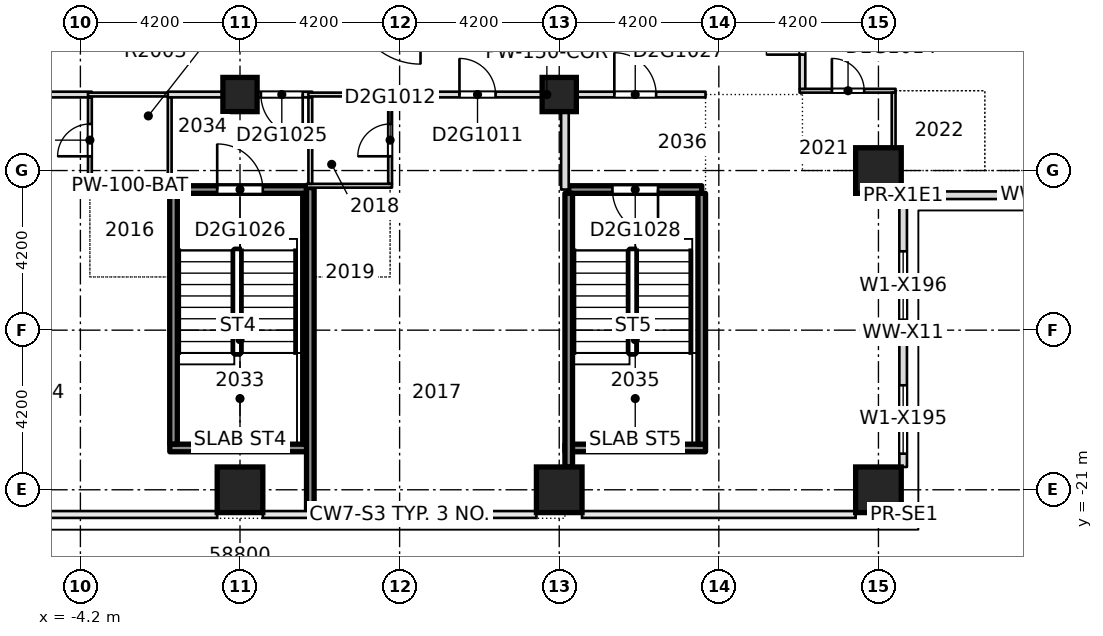
"""IFC4 building model, lengths in metres.
Left out: names, types, materials, properties, quantities, classifications, styles, units other than length and angle.
Written with IfcOpenShell. Run it as: python <this file> out.ifc"""

import sys

from ifc_helpers import new_model, si_unit, direction, frame, frame_2d, origin, origin_2d, place, context, subcontext, project, spatial, rectangle, extrude, element, fill, save


model = new_model("IFC4")
c1 = context("Model", 3, precision=1e-05, world=origin(), true_north=direction((0.0, 1.0)))
c2 = subcontext(c1, "Body", "Model", "MODEL_VIEW")
j1 = project(units=[si_unit("LENGTHUNIT", "METRE"), si_unit("PLANEANGLEUNIT", "RADIAN")], contexts=[c1])
p1 = place(None, origin())
s1 = spatial("IfcSite", under=j1, at=p1, CompositionType="ELEMENT")
p2 = place(p1, origin())
s2 = spatial("IfcBuilding", under=s1, at=p2, CompositionType="ELEMENT")
p3 = place(p2, frame((0.0, 0.0, 83.85)))
s3 = spatial("IfcBuildingStorey", under=s2, at=p3, CompositionType="ELEMENT", Elevation=83.85)
for number, where, z_axis, x_axis in (
    (1, (0.0, -21.0, -0.32), (0.0, 0.0, 1.0), (1.0, 0.0, 0.0)),
    (2, (8.4, -21.0, -0.32), (0.0, 0.0, 1.0), (1.0, 0.0, 0.0)),
    (3, (16.8, -21.0, -0.32), (0.0, 0.0, 1.0), (1.0, 0.0, 0.0)),
    (4, (16.8, -12.6, -0.32), (0.0, 0.0, 1.0), (1.0, 0.0, 0.0)),
):
    element("IfcColumn", number, at=place(p3, frame(where, z_axis=z_axis, x_axis=x_axis)), inside=s3, PredefinedType="COLUMN", context=c2, shape_type="SweptSolid", body=[
        extrude(rectangle(XDim=1.2, YDim=1.2, at=origin_2d()), origin(), (0.0, 0.0, 1.0), 3.45),
    ])
for number, where, z_axis, x_axis in (
    (5, (0.0, -10.6, -0.32), (0.0, 0.0, 1.0), (1.0, 0.0, 0.0)),
    (6, (8.4, -10.6, -0.32), (0.0, 0.0, 1.0), (1.0, 0.0, 0.0)),
):
    element("IfcColumn", number, at=place(p3, frame(where, z_axis=z_axis, x_axis=x_axis)), inside=s3, PredefinedType="COLUMN", context=c2, shape_type="SweptSolid", body=[
        extrude(rectangle(XDim=0.9, YDim=0.9, at=origin_2d()), origin(), (0.0, 0.0, 1.0), 3.45),
    ])
p4 = place(p3, frame((-1.848, -19.9, 0.0), z_axis=(0.0, 0.0, 1.0), x_axis=(1.0, 0.0, 0.0)))
e7 = element("IfcWall", 7, at=p4, inside=s3, PredefinedType="SOLIDWALL", context=c2, shape_type="SweptSolid", body=[
    extrude(rectangle(XDim=3.696, YDim=0.2, at=frame_2d((1.848, 0.0))), origin(), (0.0, 0.0, 1.0), 3.13),
])
p5 = place(p3, frame((-1.848, -13.1, 0.0), z_axis=(0.0, 0.0, 1.0), x_axis=(1.0, 0.0, 0.0)))
e8 = element("IfcWall", 8, at=p5, inside=s3, PredefinedType="SOLIDWALL", context=c2, shape_type="SweptSolid", body=[
    extrude(rectangle(XDim=3.596, YDim=0.2, at=frame_2d((1.798, 0.0))), origin(), (0.0, 0.0, 1.0), 3.13),
])
p6 = place(p5, frame((1.248, 0.0, 0.0)))
e9 = element("IfcOpeningElement", 9, at=p6, cuts=e8, PredefinedType="OPENING", context=c2, shape_type="SweptSolid", body=[
    extrude(rectangle(XDim=1.2, YDim=2.1, at=frame_2d((0.6, 1.05))), frame((0.0, 0.11, 0.0), z_axis=(0.0, -1.0, 0.0), x_axis=(1.0, 0.0, 0.0)), (0.0, 0.0, 1.0), 0.22),
])
p7 = place(p3, frame((8.65, -13.1, 0.0), z_axis=(0.0, 0.0, 1.0), x_axis=(1.0, 0.0, 0.0)))
e10 = element("IfcWall", 10, at=p7, inside=s3, PredefinedType="SOLIDWALL", context=c2, shape_type="SweptSolid", body=[
    extrude(rectangle(XDim=3.5, YDim=0.2, at=frame_2d((1.75, 0.0))), origin(), (0.0, 0.0, 1.0), 3.13),
])
p8 = place(p7, frame((1.15, 0.0, 0.0)))
e11 = element("IfcOpeningElement", 11, at=p8, cuts=e10, PredefinedType="OPENING", context=c2, shape_type="SweptSolid", body=[
    extrude(rectangle(XDim=1.2, YDim=2.1, at=frame_2d((0.6, 1.05))), frame((0.0, 0.11, 0.0), z_axis=(0.0, -1.0, 0.0), x_axis=(1.0, 0.0, 0.0)), (0.0, 0.0, 1.0), 0.22),
])
p9 = place(p3, frame((-4.0, -13.0, 0.0), z_axis=(0.0, 0.0, 1.0), x_axis=(1.0, 0.0, 0.0)))
e12 = element("IfcWall", 12, at=p9, inside=s3, PredefinedType="PARTITIONING", context=c2, shape_type="SweptSolid", body=[
    extrude(rectangle(XDim=2.2, YDim=0.1, at=frame_2d((1.1, 0.0))), origin(), (0.0, 0.0, 1.0), 3.13),
])
p10 = place(p3, frame((1.75, -13.0, 0.0), z_axis=(0.0, 0.0, 1.0), x_axis=(1.0, 0.0, 0.0)))
e13 = element("IfcWall", 13, at=p10, inside=s3, PredefinedType="PARTITIONING", context=c2, shape_type="SweptSolid", body=[
    extrude(rectangle(XDim=2.25, YDim=0.1, at=frame_2d((1.125, 0.0))), origin(), (0.0, 0.0, 1.0), 3.13),
])
p11 = place(p3, frame((-12.25, -10.6, 0.0), z_axis=(0.0, 0.0, 1.0), x_axis=(1.0, 0.0, 0.0)))
e14 = element("IfcWall", 14, at=p11, inside=s3, PredefinedType="PARTITIONING", context=c2, shape_type="SweptSolid", body=[
    extrude(rectangle(XDim=8.35, YDim=0.15, at=frame_2d((4.175, 0.0))), origin(), (0.0, 0.0, 1.0), 3.13),
])
p12 = place(p11, frame((5.525, 0.0, 0.0)))
e15 = element("IfcOpeningElement", 15, at=p12, cuts=e14, PredefinedType="OPENING", context=c2, shape_type="SweptSolid", body=[
    extrude(rectangle(XDim=0.95, YDim=2.1, at=frame_2d((0.475, 1.05))), frame((0.0, 0.085, 0.0), z_axis=(0.0, -1.0, 0.0), x_axis=(1.0, 0.0, 0.0)), (0.0, 0.0, 1.0), 0.17),
])
p13 = place(p11, frame((1.3, 0.0, 0.0)))
e16 = element("IfcOpeningElement", 16, at=p13, cuts=e14, PredefinedType="OPENING", context=c2, shape_type="SweptSolid", body=[
    extrude(rectangle(XDim=1.1, YDim=2.1, at=frame_2d((0.55, 1.05))), frame((0.0, 0.085, 0.0), z_axis=(0.0, -1.0, 0.0), x_axis=(1.0, 0.0, 0.0)), (0.0, 0.0, 1.0), 0.17),
])
p14 = place(p3, frame((-4.0, -10.6, 0.0), z_axis=(0.0, 0.0, 1.0), x_axis=(1.0, 0.0, 0.0)))
e17 = element("IfcWall", 17, at=p14, inside=s3, PredefinedType="PARTITIONING", context=c2, shape_type="SweptSolid", body=[
    extrude(rectangle(XDim=2.2, YDim=0.1, at=frame_2d((1.1, 0.0))), origin(), (0.0, 0.0, 1.0), 3.13),
])
p15 = place(p3, frame((-1.9, -10.6, 0.0), z_axis=(0.0, 0.0, 1.0), x_axis=(1.0, 0.0, 0.0)))
e18 = element("IfcWall", 18, at=p15, inside=s3, PredefinedType="PARTITIONING", context=c2, shape_type="SweptSolid", body=[
    extrude(rectangle(XDim=3.8, YDim=0.15, at=frame_2d((1.9, 0.0))), origin(), (0.0, 0.0, 1.0), 3.13),
])
p16 = place(p15, frame((2.45, 0.0, 0.0)))
e19 = element("IfcOpeningElement", 19, at=p16, cuts=e18, PredefinedType="OPENING", context=c2, shape_type="SweptSolid", body=[
    extrude(rectangle(XDim=1.1, YDim=2.1, at=frame_2d((0.55, 1.05))), frame((0.0, 0.085, 0.0), z_axis=(0.0, -1.0, 0.0), x_axis=(1.0, 0.0, 0.0)), (0.0, 0.0, 1.0), 0.17),
])
p17 = place(p3, frame((1.8, -10.6, 0.0), z_axis=(0.0, 0.0, 1.0), x_axis=(1.0, 0.0, 0.0)))
e20 = element("IfcWall", 20, at=p17, inside=s3, PredefinedType="PARTITIONING", context=c2, shape_type="SweptSolid", body=[
    extrude(rectangle(XDim=2.2, YDim=0.1, at=frame_2d((1.1, 0.0))), origin(), (0.0, 0.0, 1.0), 3.13),
])
p18 = place(p3, frame((3.9, -10.6, 0.0), z_axis=(0.0, 0.0, 1.0), x_axis=(1.0, 0.0, 0.0)))
e21 = element("IfcWall", 21, at=p18, inside=s3, PredefinedType="PARTITIONING", context=c2, shape_type="SweptSolid", body=[
    extrude(rectangle(XDim=8.35, YDim=0.15, at=frame_2d((4.175, 0.0))), origin(), (0.0, 0.0, 1.0), 3.13),
])
p19 = place(p18, frame((1.875, 0.0, 0.0)))
e22 = element("IfcOpeningElement", 22, at=p19, cuts=e21, PredefinedType="OPENING", context=c2, shape_type="SweptSolid", body=[
    extrude(rectangle(XDim=0.95, YDim=2.1, at=frame_2d((0.475, 1.05))), frame((0.0, 0.085, 0.0), z_axis=(0.0, -1.0, 0.0), x_axis=(1.0, 0.0, 0.0)), (0.0, 0.0, 1.0), 0.17),
])
p20 = place(p18, frame((5.95, 0.0, 0.0)))
e23 = element("IfcOpeningElement", 23, at=p20, cuts=e21, PredefinedType="OPENING", context=c2, shape_type="SweptSolid", body=[
    extrude(rectangle(XDim=1.1, YDim=2.1, at=frame_2d((0.55, 1.05))), frame((0.0, 0.085, 0.0), z_axis=(0.0, -1.0, 0.0), x_axis=(1.0, 0.0, 0.0)), (0.0, 0.0, 1.0), 0.17),
])
p21 = place(p3, frame((14.725, -10.5, 0.0), z_axis=(0.0, 0.0, 1.0), x_axis=(1.0, 0.0, 0.0)))
e24 = element("IfcWall", 24, at=p21, inside=s3, PredefinedType="PARTITIONING", context=c2, shape_type="SweptSolid", body=[
    extrude(rectangle(XDim=2.525, YDim=0.1, at=frame_2d((1.262, 0.0))), origin(), (0.0, 0.0, 1.0), 3.13),
])
p22 = place(p21, frame((0.85, 0.0, 0.0)))
e25 = element("IfcOpeningElement", 25, at=p22, cuts=e24, PredefinedType="OPENING", context=c2, shape_type="SweptSolid", body=[
    extrude(rectangle(XDim=0.85, YDim=2.1, at=frame_2d((0.425, 1.05))), frame((0.0, 0.06, 0.0), z_axis=(0.0, -1.0, 0.0), x_axis=(1.0, 0.0, 0.0)), (0.0, 0.0, 1.0), 0.12),
])
p23 = place(p3, frame((-3.95, -12.95, 0.0), z_axis=(0.0, 0.0, 1.0), x_axis=(0.0, 1.0, 0.0)))
e26 = element("IfcWall", 26, at=p23, inside=s3, PredefinedType="PARTITIONING", context=c2, shape_type="SweptSolid", body=[
    extrude(rectangle(XDim=2.275, YDim=0.1, at=frame_2d((1.137, 0.0))), origin(), (0.0, 0.0, 1.0), 3.13),
])
p24 = place(p23, frame((0.725, 0.0, 0.0)))
e27 = element("IfcOpeningElement", 27, at=p24, cuts=e26, PredefinedType="OPENING", context=c2, shape_type="SweptSolid", body=[
    extrude(rectangle(XDim=0.85, YDim=2.1, at=frame_2d((0.425, 1.05))), frame((0.0, 0.06, 0.0), z_axis=(0.0, -1.0, 0.0), x_axis=(1.0, 0.0, 0.0)), (0.0, 0.0, 1.0), 0.12),
])
p25 = place(p3, frame((-1.85, -12.95, 0.0), z_axis=(0.0, 0.0, 1.0), x_axis=(0.0, 1.0, 0.0)))
e28 = element("IfcWall", 28, at=p25, inside=s3, PredefinedType="PARTITIONING", context=c2, shape_type="SweptSolid", body=[
    extrude(rectangle(XDim=2.275, YDim=0.1, at=frame_2d((1.137, 0.0))), origin(), (0.0, 0.0, 1.0), 3.13),
])
for number, where, z_axis, x_axis in (
    (29, (-1.75, -19.798, 0.0), (0.0, 0.0, 1.0), (0.0, 1.0, 0.0)),
    (30, (1.75, -19.798, 0.0), (0.0, 0.0, 1.0), (0.0, 1.0, 0.0)),
):
    element("IfcWall", number, at=place(p3, frame(where, z_axis=z_axis, x_axis=x_axis)), inside=s3, PredefinedType="SOLIDWALL", context=c2, shape_type="SweptSolid", body=[
        extrude(rectangle(XDim=6.596, YDim=0.2, at=frame_2d((3.298, 0.0))), origin(), (0.0, 0.0, 1.0), 3.13),
    ])
p26 = place(p3, frame((1.85, -12.95, 0.0), z_axis=(0.0, 0.0, 1.0), x_axis=(0.0, 1.0, 0.0)))
e31 = element("IfcWall", 31, at=p26, inside=s3, PredefinedType="PARTITIONING", context=c2, shape_type="SweptSolid", body=[
    extrude(rectangle(XDim=2.275, YDim=0.1, at=frame_2d((1.137, 0.0))), origin(), (0.0, 0.0, 1.0), 3.13),
])
p27 = place(p3, frame((3.95, -12.95, 0.0), z_axis=(0.0, 0.0, 1.0), x_axis=(0.0, 1.0, 0.0)))
e32 = element("IfcWall", 32, at=p27, inside=s3, PredefinedType="PARTITIONING", context=c2, shape_type="SweptSolid", body=[
    extrude(rectangle(XDim=2.275, YDim=0.1, at=frame_2d((1.137, 0.0))), origin(), (0.0, 0.0, 1.0), 3.13),
])
p28 = place(p27, frame((0.725, 0.0, 0.0)))
e33 = element("IfcOpeningElement", 33, at=p28, cuts=e32, PredefinedType="OPENING", context=c2, shape_type="SweptSolid", body=[
    extrude(rectangle(XDim=0.85, YDim=2.1, at=frame_2d((0.425, 1.05))), frame((0.0, 0.06, 0.0), z_axis=(0.0, -1.0, 0.0), x_axis=(1.0, 0.0, 0.0)), (0.0, 0.0, 1.0), 0.12),
])
p29 = place(p3, frame((8.55, -13.1, 0.0), z_axis=(0.0, 0.0, 1.0), x_axis=(0.0, 1.0, 0.0)))
e34 = element("IfcWall", 34, at=p29, inside=s3, PredefinedType="PARTITIONING", context=c2, shape_type="SweptSolid", body=[
    extrude(rectangle(XDim=2.425, YDim=0.2, at=frame_2d((1.212, 0.0))), origin(), (0.0, 0.0, 1.0), 3.13),
])
p30 = place(p3, frame((14.8, -10.45, 0.0), z_axis=(0.0, 0.0, 1.0), x_axis=(0.0, 1.0, 0.0)))
e35 = element("IfcWall", 35, at=p30, inside=s3, PredefinedType="PARTITIONING", context=c2, shape_type="SweptSolid", body=[
    extrude(rectangle(XDim=20.875, YDim=0.15, at=frame_2d((10.438, 0.0))), origin(), (0.0, 0.0, 1.0), 3.13),
])
p31 = place(p30, frame((0.9, 0.0, 0.0)))
e36 = element("IfcOpeningElement", 36, at=p31, cuts=e35, PredefinedType="OPENING", context=c2, shape_type="SweptSolid", body=[
    extrude(rectangle(XDim=0.95, YDim=2.1, at=frame_2d((0.475, 1.05))), frame((0.0, 0.085, 0.0), z_axis=(0.0, -1.0, 0.0), x_axis=(1.0, 0.0, 0.0)), (0.0, 0.0, 1.0), 0.17),
])
p32 = place(p30, frame((16.9, 0.0, 0.0)))
e37 = element("IfcOpeningElement", 37, at=p32, cuts=e35, PredefinedType="OPENING", context=c2, shape_type="SweptSolid", body=[
    extrude(rectangle(XDim=1.0, YDim=2.1, at=frame_2d((0.5, 1.05))), frame((0.0, 0.085, 0.0), z_axis=(0.0, -1.0, 0.0), x_axis=(1.0, 0.0, 0.0)), (0.0, 0.0, 1.0), 0.17),
])
p33 = place(p30, frame((9.9, 0.0, 0.0)))
e38 = element("IfcOpeningElement", 38, at=p33, cuts=e35, PredefinedType="OPENING", context=c2, shape_type="SweptSolid", body=[
    extrude(rectangle(XDim=1.1, YDim=2.1, at=frame_2d((0.55, 1.05))), frame((0.0, 0.085, 0.0), z_axis=(0.0, -1.0, 0.0), x_axis=(1.0, 0.0, 0.0)), (0.0, 0.0, 1.0), 0.17),
])
p34 = place(p30, frame((4.7, 0.0, 0.0)))
e39 = element("IfcOpeningElement", 39, at=p34, cuts=e35, PredefinedType="OPENING", context=c2, shape_type="SweptSolid", body=[
    extrude(rectangle(XDim=1.0, YDim=2.1, at=frame_2d((0.5, 1.05))), frame((0.0, 0.085, 0.0), z_axis=(0.0, -1.0, 0.0), x_axis=(1.0, 0.0, 0.0)), (0.0, 0.0, 1.0), 0.17),
])
p35 = place(p3, frame((17.2, -12.6, 0.0), z_axis=(0.0, 0.0, 1.0), x_axis=(0.0, 1.0, 0.0)))
e40 = element("IfcWall", 40, at=p35, inside=s3, PredefinedType="PARTITIONING", context=c2, shape_type="SweptSolid", body=[
    extrude(rectangle(XDim=2.05, YDim=0.1, at=frame_2d((1.025, 0.0))), origin(), (0.0, 0.0, 1.0), 3.13),
])
p36 = place(p3, frame((17.45, -20.4, 0.0), z_axis=(0.0, 0.0, 1.0), x_axis=(0.0, 1.0, 0.0)))
e41 = element("IfcWall", 41, at=p36, inside=s3, PredefinedType="STANDARD", context=c2, shape_type="SweptSolid", body=[
    extrude(rectangle(XDim=7.05, YDim=0.2, at=frame_2d((3.525, 0.0))), origin(), (0.0, 0.0, 1.0), 3.13),
])
p37 = place(p36, frame((0.35, 0.0, 0.2)))
e42 = element("IfcOpeningElement", 42, at=p37, cuts=e41, PredefinedType="OPENING", context=c2, shape_type="SweptSolid", body=[
    extrude(rectangle(XDim=1.8, YDim=2.65, at=frame_2d((0.9, 1.325))), frame((0.0, 0.11, 0.0), z_axis=(0.0, -1.0, 0.0), x_axis=(1.0, 0.0, 0.0)), (0.0, 0.0, 1.0), 0.22),
])
p38 = place(p36, frame((3.875, 0.0, 0.2)))
e43 = element("IfcOpeningElement", 43, at=p38, cuts=e41, PredefinedType="OPENING", context=c2, shape_type="SweptSolid", body=[
    extrude(rectangle(XDim=1.8, YDim=2.65, at=frame_2d((0.9, 1.325))), frame((0.0, 0.11, 0.0), z_axis=(0.0, -1.0, 0.0), x_axis=(1.0, 0.0, 0.0)), (0.0, 0.0, 1.0), 0.22),
])
p39 = place(p3, frame((17.55, -13.25, 0.0), z_axis=(0.0, 0.0, 1.0), x_axis=(1.0, 0.0, 0.0)))
e44 = element("IfcWall", 44, at=p39, inside=s3, PredefinedType="STANDARD", context=c2, shape_type="SweptSolid", body=[
    extrude(rectangle(XDim=7.05, YDim=0.2, at=frame_2d((3.525, 0.0))), origin(), (0.0, 0.0, 1.0), 3.13),
])
p40 = place(p3, frame((8.55, -19.9, 0.0), z_axis=(0.0, 0.0, 1.0), x_axis=(1.0, 0.0, 0.0)))
e45 = element("IfcWall", 45, at=p40, inside=s3, PredefinedType="SOLIDWALL", context=c2, shape_type="SweptSolid", body=[
    extrude(rectangle(XDim=3.7, YDim=0.2, at=frame_2d((1.85, 0.0))), origin(), (0.0, 0.0, 1.0), 3.13),
])
p41 = place(p3, frame((8.65, -20.4, 0.0), z_axis=(0.0, 0.0, 1.0), x_axis=(0.0, 1.0, 0.0)))
e46 = element("IfcWall", 46, at=p41, inside=s3, PredefinedType="SOLIDWALL", context=c2, shape_type="SweptSolid", body=[
    extrude(rectangle(XDim=7.2, YDim=0.2, at=frame_2d((3.6, 0.0))), origin(), (0.0, 0.0, 1.0), 3.13),
])
p42 = place(p3, frame((12.15, -19.8, 0.0), z_axis=(0.0, 0.0, 1.0), x_axis=(0.0, 1.0, 0.0)))
e47 = element("IfcWall", 47, at=p42, inside=s3, PredefinedType="SOLIDWALL", context=c2, shape_type="SweptSolid", body=[
    extrude(rectangle(XDim=6.6, YDim=0.2, at=frame_2d((3.3, 0.0))), origin(), (0.0, 0.0, 1.0), 3.13),
])
p43 = place(p3, frame((1.85, -21.55, 0.0), z_axis=(0.0, 0.0, 1.0), x_axis=(0.0, 1.0, 0.0)))
e48 = element("IfcWall", 48, at=p43, inside=s3, PredefinedType="SOLIDWALL", context=c2, shape_type="SweptSolid", body=[
    extrude(rectangle(XDim=8.5, YDim=0.2, at=frame_2d((4.25, 0.0))), origin(), (0.0, 0.0, 1.0), 3.13),
])
p44 = place(p24, origin())
e49 = element("IfcDoor", 49, at=p44, inside=s3, OperationType="SINGLE_SWING_RIGHT", PredefinedType="DOOR", context=c2, shape_type="SweptSolid", body=[
    extrude(rectangle(XDim=0.85, YDim=2.1, at=frame_2d((0.425, 1.05))), frame((0.0, 0.025, 0.0), z_axis=(0.0, -1.0, 0.0), x_axis=(1.0, 0.0, 0.0)), (0.0, 0.0, 1.0), 0.05),
])
fill(e27, e49)
p45 = place(p19, origin())
e50 = element("IfcDoor", 50, at=p45, inside=s3, OperationType="SINGLE_SWING_LEFT", PredefinedType="DOOR", context=c2, shape_type="SweptSolid", body=[
    extrude(rectangle(XDim=0.95, YDim=2.1, at=frame_2d((0.475, 1.05))), frame((0.0, 0.025, 0.0), z_axis=(0.0, -1.0, 0.0), x_axis=(1.0, 0.0, 0.0)), (0.0, 0.0, 1.0), 0.05),
])
fill(e22, e50)
p46 = place(p28, origin())
e51 = element("IfcDoor", 51, at=p46, inside=s3, OperationType="SINGLE_SWING_LEFT", PredefinedType="DOOR", context=c2, shape_type="SweptSolid", body=[
    extrude(rectangle(XDim=0.85, YDim=2.1, at=frame_2d((0.425, 1.05))), frame((0.0, 0.025, 0.0), z_axis=(0.0, -1.0, 0.0), x_axis=(1.0, 0.0, 0.0)), (0.0, 0.0, 1.0), 0.05),
])
fill(e33, e51)
p47 = place(p31, origin())
e52 = element("IfcDoor", 52, at=p47, inside=s3, OperationType="SINGLE_SWING_RIGHT", PredefinedType="DOOR", context=c2, shape_type="SweptSolid", body=[
    extrude(rectangle(XDim=0.95, YDim=2.1, at=frame_2d((0.475, 1.05))), frame((0.0, 0.025, 0.0), z_axis=(0.0, -1.0, 0.0), x_axis=(1.0, 0.0, 0.0)), (0.0, 0.0, 1.0), 0.05),
])
fill(e36, e52)
p48 = place(p22, origin())
e53 = element("IfcDoor", 53, at=p48, inside=s3, OperationType="SINGLE_SWING_RIGHT", PredefinedType="DOOR", context=c2, shape_type="SweptSolid", body=[
    extrude(rectangle(XDim=0.85, YDim=2.1, at=frame_2d((0.425, 1.05))), frame((0.0, 0.025, 0.0), z_axis=(0.0, -1.0, 0.0), x_axis=(1.0, 0.0, 0.0)), (0.0, 0.0, 1.0), 0.05),
])
fill(e25, e53)
p49 = place(p16, origin())
e54 = element("IfcDoor", 54, at=p49, inside=s3, OperationType="SINGLE_SWING_LEFT", PredefinedType="DOOR", context=c2, shape_type="SweptSolid", body=[
    extrude(rectangle(XDim=1.1, YDim=2.1, at=frame_2d((0.55, 1.05))), frame((0.0, 0.025, 0.0), z_axis=(0.0, -1.0, 0.0), x_axis=(1.0, 0.0, 0.0)), (0.0, 0.0, 1.0), 0.05),
])
fill(e19, e54)
p50 = place(p6, origin())
e55 = element("IfcDoor", 55, at=p50, inside=s3, OperationType="SINGLE_SWING_RIGHT", PredefinedType="DOOR", context=c2, shape_type="SweptSolid", body=[
    extrude(rectangle(XDim=1.2, YDim=2.1, at=frame_2d((0.6, 1.05))), frame((0.0, 0.025, 0.0), z_axis=(0.0, -1.0, 0.0), x_axis=(1.0, 0.0, 0.0)), (0.0, 0.0, 1.0), 0.05),
])
fill(e9, e55)
p51 = place(p20, origin())
e56 = element("IfcDoor", 56, at=p51, inside=s3, OperationType="SINGLE_SWING_LEFT", PredefinedType="DOOR", context=c2, shape_type="SweptSolid", body=[
    extrude(rectangle(XDim=1.1, YDim=2.1, at=frame_2d((0.55, 1.05))), frame((0.0, 0.025, 0.0), z_axis=(0.0, -1.0, 0.0), x_axis=(1.0, 0.0, 0.0)), (0.0, 0.0, 1.0), 0.05),
])
fill(e23, e56)
p52 = place(p8, origin())
e57 = element("IfcDoor", 57, at=p52, inside=s3, OperationType="SINGLE_SWING_RIGHT", PredefinedType="DOOR", context=c2, shape_type="SweptSolid", body=[
    extrude(rectangle(XDim=1.2, YDim=2.1, at=frame_2d((0.6, 1.05))), frame((0.0, 0.025, 0.0), z_axis=(0.0, -1.0, 0.0), x_axis=(1.0, 0.0, 0.0)), (0.0, 0.0, 1.0), 0.05),
])
fill(e11, e57)
p53 = place(p37, origin())
e58 = element("IfcWindow", 58, at=p53, inside=s3, PartitioningType="SINGLE_PANEL", PredefinedType="WINDOW", context=c2, shape_type="SweptSolid", body=[
    extrude(rectangle(XDim=1.8, YDim=2.65, at=frame_2d((0.9, 1.325))), frame((0.0, 0.03, 0.0), z_axis=(0.0, -1.0, 0.0), x_axis=(1.0, 0.0, 0.0)), (0.0, 0.0, 1.0), 0.06),
])
fill(e42, e58)
p54 = place(p38, origin())
e59 = element("IfcWindow", 59, at=p54, inside=s3, PartitioningType="SINGLE_PANEL", PredefinedType="WINDOW", context=c2, shape_type="SweptSolid", body=[
    extrude(rectangle(XDim=1.8, YDim=2.65, at=frame_2d((0.9, 1.325))), frame((0.0, 0.03, 0.0), z_axis=(0.0, -1.0, 0.0), x_axis=(1.0, 0.0, 0.0)), (0.0, 0.0, 1.0), 0.06),
])
fill(e43, e59)
save(model, sys.argv[1])
